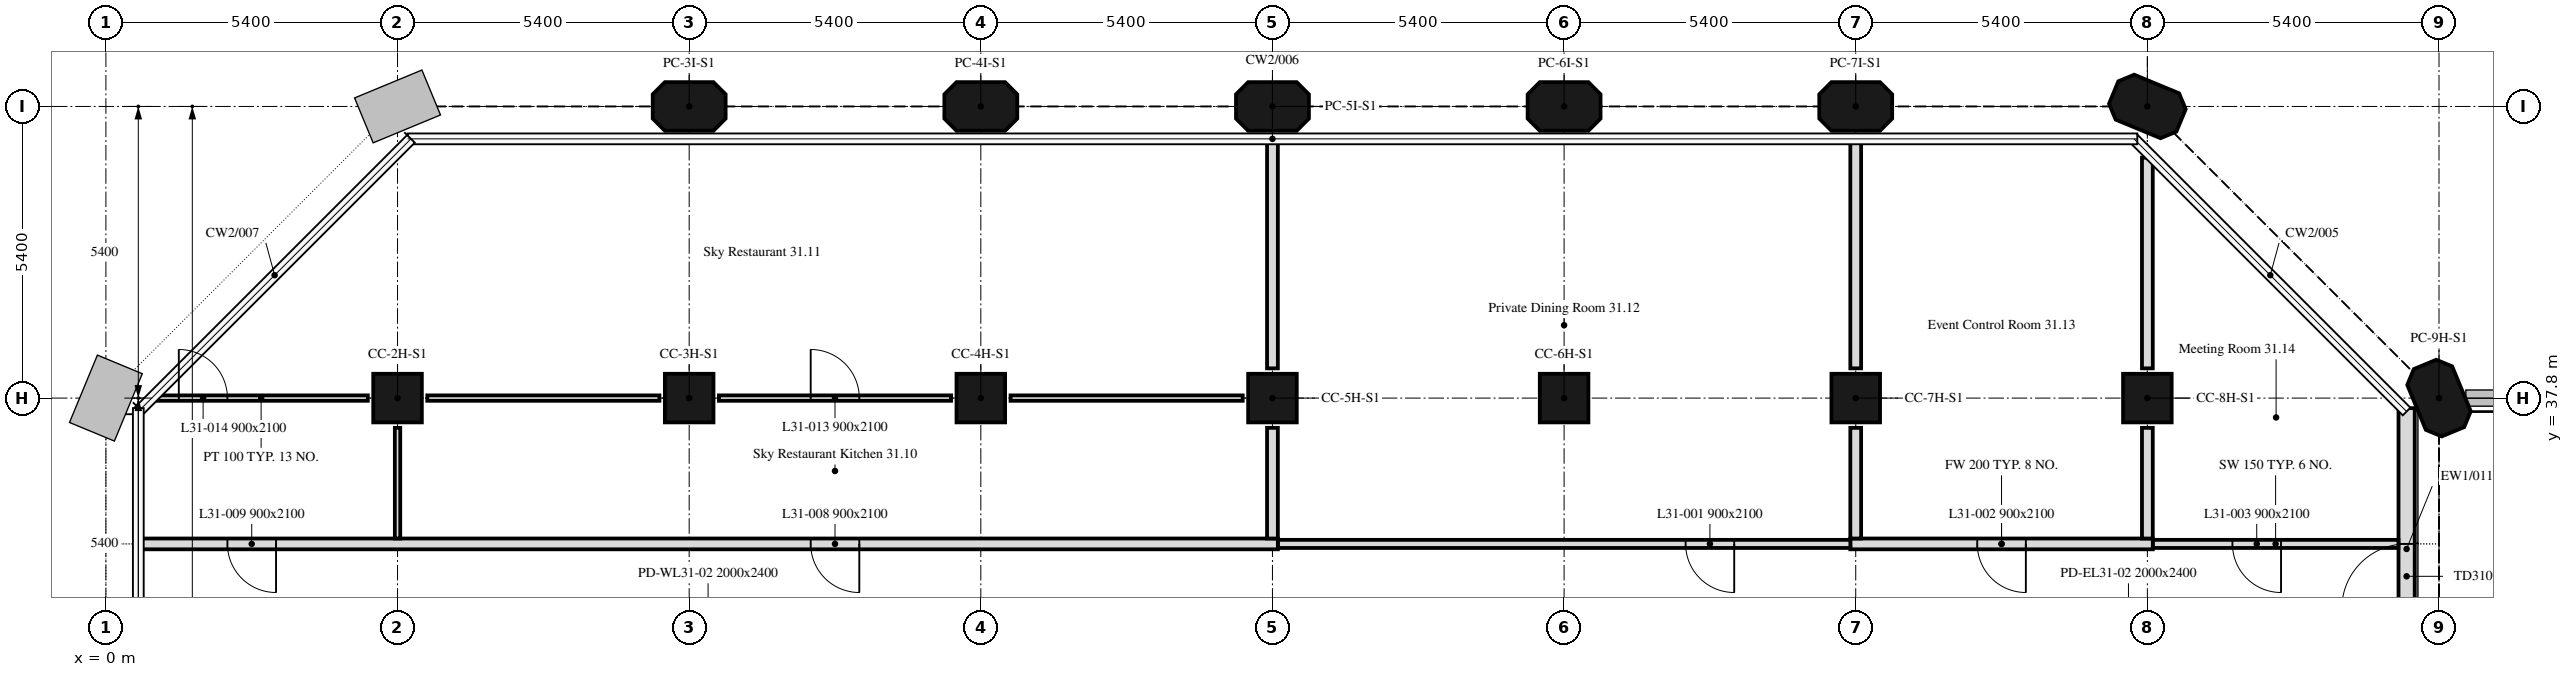
"""IFC4 building model, lengths in metres.
Left out: names, types, materials, properties, quantities, classifications, styles, units other than length and angle.
Written with IfcOpenShell. Run it as: python <this file> out.ifc"""

import sys

from ifc_helpers import new_model, si_unit, direction, frame, frame_2d, origin, origin_2d, place, context, subcontext, project, spatial, polyline, rectangle, outline, extrude, element, fill, save


model = new_model("IFC4")
c1 = context("Model", 3, precision=1e-05, world=origin(), true_north=direction((0.0, 1.0)))
c2 = subcontext(c1, "Body", "Model", "MODEL_VIEW")
j1 = project(units=[si_unit("LENGTHUNIT", "METRE"), si_unit("PLANEANGLEUNIT", "RADIAN")], contexts=[c1])
p1 = place(None, origin())
s1 = spatial("IfcSite", under=j1, at=p1, CompositionType="ELEMENT")
p2 = place(p1, origin())
s2 = spatial("IfcBuilding", under=s1, at=p2, CompositionType="ELEMENT")
p3 = place(p2, frame((0.0, 0.0, 130.6)))
s3 = spatial("IfcBuildingStorey", under=s2, at=p3, CompositionType="ELEMENT", Elevation=130.6)
for number, where, z_axis, x_axis in (
    (1, (5.4, 37.8, 0.0), (0.0, 0.0, 1.0), (1.0, 0.0, 0.0)),
    (2, (10.8, 37.8, 0.0), (0.0, 0.0, 1.0), (1.0, 0.0, 0.0)),
    (3, (16.2, 37.8, 0.0), (0.0, 0.0, 1.0), (1.0, 0.0, 0.0)),
    (4, (21.6, 37.8, 0.0), (0.0, 0.0, 1.0), (1.0, 0.0, 0.0)),
    (5, (27.0, 37.8, 0.0), (0.0, 0.0, 1.0), (1.0, 0.0, 0.0)),
    (6, (32.4, 37.8, 0.0), (0.0, 0.0, 1.0), (1.0, 0.0, 0.0)),
    (7, (37.8, 37.8, 0.0), (0.0, 0.0, 1.0), (1.0, 0.0, 0.0)),
):
    element("IfcColumn", number, at=place(p3, frame(where, z_axis=z_axis, x_axis=x_axis)), inside=s3, PredefinedType="COLUMN", context=c2, shape_type="SweptSolid", body=[
        extrude(rectangle(XDim=0.9, YDim=0.9, at=origin_2d()), origin(), (0.0, 0.0, 1.0), 7.5),
    ])
for number, where, z_axis, x_axis in (
    (8, (43.2, 37.8, 0.0), (0.0, 0.0, 1.0), (-0.383, 0.924, 0.0)),
    (9, (10.8, 43.2, 0.0), (0.0, 0.0, 1.0), (1.0, 0.0, 0.0)),
    (10, (16.2, 43.2, 0.0), (0.0, 0.0, 1.0), (1.0, 0.0, 0.0)),
    (11, (21.6, 43.2, 0.0), (0.0, 0.0, 1.0), (1.0, 0.0, 0.0)),
    (12, (27.0, 43.2, 0.0), (0.0, 0.0, 1.0), (1.0, 0.0, 0.0)),
    (13, (32.4, 43.2, 0.0), (0.0, 0.0, 1.0), (1.0, 0.0, 0.0)),
    (14, (37.8, 43.2, 0.0), (0.0, 0.0, 1.0), (-0.924, 0.383, 0.0)),
):
    element("IfcColumn", number, at=place(p3, frame(where, z_axis=z_axis, x_axis=x_axis)), inside=s3, PredefinedType="COLUMN", context=c2, shape_type="SweptSolid", body=[
        extrude(outline(polyline([(-0.45, -0.45), (0.45, -0.45), (0.675, -0.225), (0.675, 0.225), (0.45, 0.45), (-0.45, 0.45), (-0.675, 0.225), (-0.675, -0.225), (-0.45, -0.45)])), origin(), (0.0, 0.0, 1.0), 7.5),
    ])
p4 = place(p3, frame((42.6, 32.4, 0.0), z_axis=(0.0, 0.0, 1.0), x_axis=(0.0, 1.0, 0.0)))
e15 = element("IfcWall", 15, at=p4, inside=s3, PredefinedType="SOLIDWALL", context=c2, shape_type="SweptSolid", body=[
    extrude(rectangle(XDim=5.214, YDim=0.3, at=frame_2d((2.607, 0.0))), origin(), (0.0, 0.0, 1.0), 7.5),
])
p5 = place(p4, frame((1.5, 0.0, 0.0)))
e16 = element("IfcOpeningElement", 16, at=p5, cuts=e15, PredefinedType="OPENING", context=c2, shape_type="SweptSolid", body=[
    extrude(rectangle(XDim=1.2, YDim=2.4, at=frame_2d((0.6, 1.2))), frame((0.0, 0.16, 0.0), z_axis=(0.0, -1.0, 0.0), x_axis=(1.0, 0.0, 0.0)), (0.0, 0.0, 1.0), 0.32),
])
p6 = place(p3, frame((42.449, 35.1, 0.0), z_axis=(0.0, 0.0, 1.0), x_axis=(-1.0, 0.0, 0.0)))
e17 = element("IfcWall", 17, at=p6, inside=s3, PredefinedType="PARTITIONING", context=c2, shape_type="SweptSolid", body=[
    extrude(rectangle(XDim=4.549, YDim=0.15, at=frame_2d((2.274, 0.0))), origin(), (0.0, 0.0, 1.0), 7.5),
])
p7 = place(p6, frame((2.174, 0.0, 0.0)))
e18 = element("IfcOpeningElement", 18, at=p7, cuts=e17, PredefinedType="OPENING", context=c2, shape_type="SweptSolid", body=[
    extrude(rectangle(XDim=0.9, YDim=2.1, at=frame_2d((0.45, 1.05))), frame((0.0, 0.075, 0.0), z_axis=(0.0, -1.0, 0.0), x_axis=(1.0, 0.0, 0.0)), (0.0, 0.0, 1.0), 0.15),
])
p8 = place(p3, frame((37.9, 35.1, 0.0), z_axis=(0.0, 0.0, 1.0), x_axis=(-1.0, 0.0, 0.0)))
e19 = element("IfcWall", 19, at=p8, inside=s3, PredefinedType="PARTITIONING", context=c2, shape_type="SweptSolid", body=[
    extrude(rectangle(XDim=5.6, YDim=0.2, at=frame_2d((2.8, 0.0))), origin(), (0.0, 0.0, 1.0), 7.5),
])
p9 = place(p8, frame((2.35, 0.0, 0.0)))
e20 = element("IfcOpeningElement", 20, at=p9, cuts=e19, PredefinedType="OPENING", context=c2, shape_type="SweptSolid", body=[
    extrude(rectangle(XDim=0.9, YDim=2.1, at=frame_2d((0.45, 1.05))), frame((0.0, 0.1, 0.0), z_axis=(0.0, -1.0, 0.0), x_axis=(1.0, 0.0, 0.0)), (0.0, 0.0, 1.0), 0.2),
])
p10 = place(p3, frame((32.3, 35.1, 0.0), z_axis=(0.0, 0.0, 1.0), x_axis=(-1.0, 0.0, 0.0)))
e21 = element("IfcWall", 21, at=p10, inside=s3, PredefinedType="PARTITIONING", context=c2, shape_type="SweptSolid", body=[
    extrude(rectangle(XDim=10.6, YDim=0.15, at=frame_2d((5.3, 0.0))), origin(), (0.0, 0.0, 1.0), 6.75),
])
p11 = place(p10, frame((2.15, 0.0, 0.0)))
e22 = element("IfcOpeningElement", 22, at=p11, cuts=e21, PredefinedType="OPENING", context=c2, shape_type="SweptSolid", body=[
    extrude(rectangle(XDim=0.9, YDim=2.1, at=frame_2d((0.45, 1.05))), frame((0.0, 0.075, 0.0), z_axis=(0.0, -1.0, 0.0), x_axis=(1.0, 0.0, 0.0)), (0.0, 0.0, 1.0), 0.15),
])
p12 = place(p3, frame((21.7, 35.1, 0.0), z_axis=(0.0, 0.0, 1.0), x_axis=(-1.0, 0.0, 0.0)))
e23 = element("IfcWall", 23, at=p12, inside=s3, PredefinedType="PARTITIONING", context=c2, shape_type="SweptSolid", body=[
    extrude(rectangle(XDim=21.1, YDim=0.2, at=frame_2d((10.55, 0.0))), origin(), (0.0, 0.0, 1.0), 6.75),
])
p13 = place(p12, frame((7.75, 0.0, 0.0)))
e24 = element("IfcOpeningElement", 24, at=p13, cuts=e23, PredefinedType="OPENING", context=c2, shape_type="SweptSolid", body=[
    extrude(rectangle(XDim=0.9, YDim=2.1, at=frame_2d((0.45, 1.05))), frame((0.0, 0.1, 0.0), z_axis=(0.0, -1.0, 0.0), x_axis=(1.0, 0.0, 0.0)), (0.0, 0.0, 1.0), 0.2),
])
p14 = place(p12, frame((18.55, 0.0, 0.0)))
e25 = element("IfcOpeningElement", 25, at=p14, cuts=e23, PredefinedType="OPENING", context=c2, shape_type="SweptSolid", body=[
    extrude(rectangle(XDim=0.9, YDim=2.1, at=frame_2d((0.45, 1.05))), frame((0.0, 0.1, 0.0), z_axis=(0.0, -1.0, 0.0), x_axis=(1.0, 0.0, 0.0)), (0.0, 0.0, 1.0), 0.2),
])
p15 = place(p3, frame((32.4, 35.2, 0.0), z_axis=(0.0, 0.0, 1.0), x_axis=(0.0, 1.0, 0.0)))
e26 = element("IfcWall", 26, at=p15, inside=s3, PredefinedType="PARTITIONING", context=c2, shape_type="SweptSolid", body=[
    extrude(rectangle(XDim=2.049, YDim=0.2, at=frame_2d((1.025, 0.0))), origin(), (0.0, 0.0, 1.0), 7.5),
])
p16 = place(p3, frame((32.4, 38.351, 0.0), z_axis=(0.0, 0.0, 1.0), x_axis=(0.0, 1.0, 0.0)))
e27 = element("IfcWall", 27, at=p16, inside=s3, PredefinedType="PARTITIONING", context=c2, shape_type="SweptSolid", body=[
    extrude(rectangle(XDim=4.25, YDim=0.2, at=frame_2d((2.125, 0.0))), origin(), (0.0, 0.0, 1.0), 7.5),
])
p17 = place(p3, frame((21.6, 42.6, 0.0), z_axis=(0.0, 0.0, 1.0), x_axis=(0.0, -1.0, 0.0)))
e28 = element("IfcWall", 28, at=p17, inside=s3, PredefinedType="PARTITIONING", context=c2, shape_type="SweptSolid", body=[
    extrude(rectangle(XDim=4.25, YDim=0.2, at=frame_2d((2.125, 0.0))), origin(), (0.0, 0.0, 1.0), 6.75),
])
p18 = place(p3, frame((21.6, 37.249, 0.0), z_axis=(0.0, 0.0, 1.0), x_axis=(0.0, -1.0, 0.0)))
e29 = element("IfcWall", 29, at=p18, inside=s3, PredefinedType="PARTITIONING", context=c2, shape_type="SweptSolid", body=[
    extrude(rectangle(XDim=2.049, YDim=0.2, at=frame_2d((1.025, 0.0))), origin(), (0.0, 0.0, 1.0), 6.75),
])
p19 = place(p3, frame((37.8, 35.2, 0.0), z_axis=(0.0, 0.0, 1.0), x_axis=(0.0, 1.0, 0.0)))
e30 = element("IfcWall", 30, at=p19, inside=s3, PredefinedType="PARTITIONING", context=c2, shape_type="SweptSolid", body=[
    extrude(rectangle(XDim=2.049, YDim=0.2, at=frame_2d((1.025, 0.0))), origin(), (0.0, 0.0, 1.0), 7.5),
])
p20 = place(p3, frame((37.8, 38.351, 0.0), z_axis=(0.0, 0.0, 1.0), x_axis=(0.0, 1.0, 0.0)))
e31 = element("IfcWall", 31, at=p20, inside=s3, PredefinedType="PARTITIONING", context=c2, shape_type="SweptSolid", body=[
    extrude(rectangle(XDim=3.901, YDim=0.2, at=frame_2d((1.95, 0.0))), origin(), (0.0, 0.0, 1.0), 7.5),
])
p21 = place(p3, frame((0.898, 37.8, 0.0), z_axis=(0.0, 0.0, 1.0), x_axis=(1.0, 0.0, 0.0)))
e32 = element("IfcWall", 32, at=p21, inside=s3, PredefinedType="PARTITIONING", context=c2, shape_type="SweptSolid", body=[
    extrude(rectangle(XDim=3.951, YDim=0.1, at=frame_2d((1.976, 0.0))), origin(), (0.0, 0.0, 1.0), 7.5),
])
p22 = place(p21, frame((0.451, 0.0, 0.0)))
e33 = element("IfcOpeningElement", 33, at=p22, cuts=e32, PredefinedType="OPENING", context=c2, shape_type="SweptSolid", body=[
    extrude(rectangle(XDim=0.9, YDim=2.1, at=frame_2d((0.45, 1.05))), frame((0.0, 0.05, 0.0), z_axis=(0.0, -1.0, 0.0), x_axis=(1.0, 0.0, 0.0)), (0.0, 0.0, 1.0), 0.1),
])
p23 = place(p3, frame((5.951, 37.8, 0.0), z_axis=(0.0, 0.0, 1.0), x_axis=(1.0, 0.0, 0.0)))
e34 = element("IfcWall", 34, at=p23, inside=s3, PredefinedType="PARTITIONING", context=c2, shape_type="SweptSolid", body=[
    extrude(rectangle(XDim=4.299, YDim=0.1, at=frame_2d((2.149, 0.0))), origin(), (0.0, 0.0, 1.0), 7.5),
])
p24 = place(p3, frame((11.351, 37.8, 0.0), z_axis=(0.0, 0.0, 1.0), x_axis=(1.0, 0.0, 0.0)))
e35 = element("IfcWall", 35, at=p24, inside=s3, PredefinedType="PARTITIONING", context=c2, shape_type="SweptSolid", body=[
    extrude(rectangle(XDim=4.299, YDim=0.1, at=frame_2d((2.149, 0.0))), origin(), (0.0, 0.0, 1.0), 7.5),
])
p25 = place(p24, frame((1.699, 0.0, 0.0)))
e36 = element("IfcOpeningElement", 36, at=p25, cuts=e35, PredefinedType="OPENING", context=c2, shape_type="SweptSolid", body=[
    extrude(rectangle(XDim=0.9, YDim=2.1, at=frame_2d((0.45, 1.05))), frame((0.0, 0.05, 0.0), z_axis=(0.0, -1.0, 0.0), x_axis=(1.0, 0.0, 0.0)), (0.0, 0.0, 1.0), 0.1),
])
p26 = place(p3, frame((16.751, 37.8, 0.0), z_axis=(0.0, 0.0, 1.0), x_axis=(1.0, 0.0, 0.0)))
e37 = element("IfcWall", 37, at=p26, inside=s3, PredefinedType="PARTITIONING", context=c2, shape_type="SweptSolid", body=[
    extrude(rectangle(XDim=4.299, YDim=0.1, at=frame_2d((2.149, 0.0))), origin(), (0.0, 0.0, 1.0), 7.5),
])
p27 = place(p3, frame((5.4, 37.249, 0.0), z_axis=(0.0, 0.0, 1.0), x_axis=(0.0, -1.0, 0.0)))
e38 = element("IfcWall", 38, at=p27, inside=s3, PredefinedType="PARTITIONING", context=c2, shape_type="SweptSolid", body=[
    extrude(rectangle(XDim=2.049, YDim=0.1, at=frame_2d((1.025, 0.0))), origin(), (0.0, 0.0, 1.0), 7.5),
])
p28 = place(p5, origin())
e39 = element("IfcDoor", 39, at=p28, inside=s3, OperationType="SINGLE_SWING_LEFT", PredefinedType="DOOR", context=c2, shape_type="SweptSolid", body=[
    extrude(rectangle(XDim=1.2, YDim=2.4, at=frame_2d((0.6, 1.2))), frame((0.0, 0.025, 0.0), z_axis=(0.0, -1.0, 0.0), x_axis=(1.0, 0.0, 0.0)), (0.0, 0.0, 1.0), 0.05),
])
fill(e16, e39)
p29 = place(p11, origin())
e40 = element("IfcDoor", 40, at=p29, inside=s3, OperationType="SINGLE_SWING_LEFT", PredefinedType="DOOR", context=c2, shape_type="SweptSolid", body=[
    extrude(rectangle(XDim=0.9, YDim=2.1, at=frame_2d((0.45, 1.05))), frame((0.0, 0.025, 0.0), z_axis=(0.0, -1.0, 0.0), x_axis=(1.0, 0.0, 0.0)), (0.0, 0.0, 1.0), 0.05),
])
fill(e22, e40)
p30 = place(p9, origin())
e41 = element("IfcDoor", 41, at=p30, inside=s3, OperationType="SINGLE_SWING_LEFT", PredefinedType="DOOR", context=c2, shape_type="SweptSolid", body=[
    extrude(rectangle(XDim=0.9, YDim=2.1, at=frame_2d((0.45, 1.05))), frame((0.0, 0.025, 0.0), z_axis=(0.0, -1.0, 0.0), x_axis=(1.0, 0.0, 0.0)), (0.0, 0.0, 1.0), 0.05),
])
fill(e20, e41)
p31 = place(p7, origin())
e42 = element("IfcDoor", 42, at=p31, inside=s3, OperationType="SINGLE_SWING_LEFT", PredefinedType="DOOR", context=c2, shape_type="SweptSolid", body=[
    extrude(rectangle(XDim=0.9, YDim=2.1, at=frame_2d((0.45, 1.05))), frame((0.0, 0.025, 0.0), z_axis=(0.0, -1.0, 0.0), x_axis=(1.0, 0.0, 0.0)), (0.0, 0.0, 1.0), 0.05),
])
fill(e18, e42)
p32 = place(p13, origin())
e43 = element("IfcDoor", 43, at=p32, inside=s3, OperationType="SINGLE_SWING_RIGHT", PredefinedType="DOOR", context=c2, shape_type="SweptSolid", body=[
    extrude(rectangle(XDim=0.9, YDim=2.1, at=frame_2d((0.45, 1.05))), frame((0.0, 0.025, 0.0), z_axis=(0.0, -1.0, 0.0), x_axis=(1.0, 0.0, 0.0)), (0.0, 0.0, 1.0), 0.05),
])
fill(e24, e43)
p33 = place(p14, origin())
e44 = element("IfcDoor", 44, at=p33, inside=s3, OperationType="SINGLE_SWING_LEFT", PredefinedType="DOOR", context=c2, shape_type="SweptSolid", body=[
    extrude(rectangle(XDim=0.9, YDim=2.1, at=frame_2d((0.45, 1.05))), frame((0.0, 0.025, 0.0), z_axis=(0.0, -1.0, 0.0), x_axis=(1.0, 0.0, 0.0)), (0.0, 0.0, 1.0), 0.05),
])
fill(e25, e44)
p34 = place(p25, origin())
e45 = element("IfcDoor", 45, at=p34, inside=s3, OperationType="SINGLE_SWING_RIGHT", PredefinedType="DOOR", context=c2, shape_type="SweptSolid", body=[
    extrude(rectangle(XDim=0.9, YDim=2.1, at=frame_2d((0.45, 1.05))), frame((0.0, 0.025, 0.0), z_axis=(0.0, -1.0, 0.0), x_axis=(1.0, 0.0, 0.0)), (0.0, 0.0, 1.0), 0.05),
])
fill(e36, e45)
p35 = place(p22, origin())
e46 = element("IfcDoor", 46, at=p35, inside=s3, OperationType="SINGLE_SWING_LEFT", PredefinedType="DOOR", context=c2, shape_type="SweptSolid", body=[
    extrude(rectangle(XDim=0.9, YDim=2.1, at=frame_2d((0.45, 1.05))), frame((0.0, 0.025, 0.0), z_axis=(0.0, -1.0, 0.0), x_axis=(1.0, 0.0, 0.0)), (0.0, 0.0, 1.0), 0.05),
])
fill(e33, e46)
save(model, sys.argv[1])
